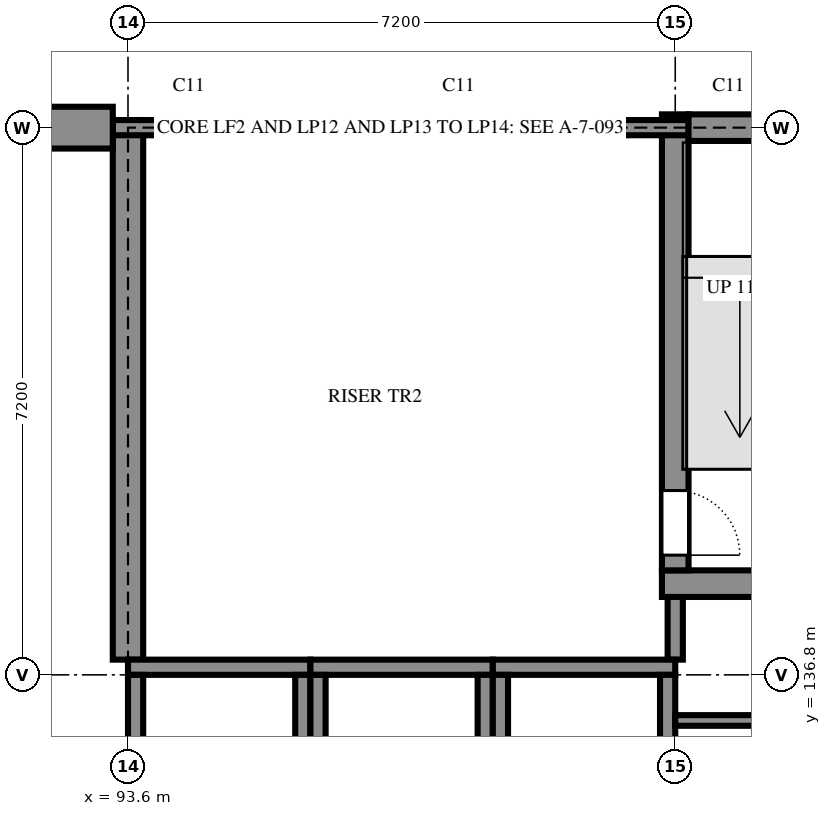
"""IFC4 building model, lengths in metres.
Left out: names, types, materials, properties, quantities, classifications, styles, units other than length and angle.
Written with IfcOpenShell. Run it as: python <this file> out.ifc"""

import sys

from ifc_helpers import new_model, si_unit, direction, frame, frame_2d, origin, origin_2d, place, context, subcontext, project, spatial, rectangle, i_section, extrude, element, fill, save


model = new_model("IFC4")
c1 = context("Model", 3, precision=1e-05, world=origin(), true_north=direction((0.0, 1.0)))
c2 = subcontext(c1, "Body", "Model", "MODEL_VIEW")
j1 = project(units=[si_unit("LENGTHUNIT", "METRE"), si_unit("PLANEANGLEUNIT", "RADIAN")], contexts=[c1])
p1 = place(None, origin())
s1 = spatial("IfcSite", under=j1, at=p1, CompositionType="ELEMENT")
p2 = place(p1, origin())
s2 = spatial("IfcBuilding", under=s1, at=p2, CompositionType="ELEMENT")
p3 = place(p2, frame((0.0, 0.0, 3.6)))
s3 = spatial("IfcBuildingStorey", under=s2, at=p3, CompositionType="ELEMENT", Elevation=3.6)
p4 = place(p3, frame((100.8, 137.0, 0.0), z_axis=(0.0, 0.0, 1.0), x_axis=(0.0, 1.0, 0.0)))
e1 = element("IfcWall", 1, at=p4, inside=s3, PredefinedType="SHEAR", context=c2, shape_type="SweptSolid", body=[
    extrude(rectangle(XDim=1.175, YDim=0.2, at=frame_2d((0.587, 0.0))), origin(), (0.0, 0.0, 1.0), 3.6),
])
p5 = place(p3, frame((100.625, 138.0, 0.0), z_axis=(0.0, 0.0, 1.0), x_axis=(1.0, 0.0, 0.0)))
e2 = element("IfcWall", 2, at=p5, inside=s3, PredefinedType="SHEAR", context=c2, shape_type="SweptSolid", body=[
    extrude(rectangle(XDim=3.75, YDim=0.35, at=frame_2d((1.875, 0.0))), origin(), (0.0, 0.0, 1.0), 3.6),
])
p6 = place(p5, frame((1.375, 0.0, 0.0)))
e3 = element("IfcOpeningElement", 3, at=p6, cuts=e2, PredefinedType="OPENING", context=c2, shape_type="SweptSolid", body=[
    extrude(rectangle(XDim=1.0, YDim=2.1, at=frame_2d((0.5, 1.05))), frame((0.0, 0.185, 0.0), z_axis=(0.0, -1.0, 0.0), x_axis=(1.0, 0.0, 0.0)), (0.0, 0.0, 1.0), 0.37),
])
p7 = place(p3, frame((93.6, 144.1, 0.0), z_axis=(0.0, 0.0, 1.0), x_axis=(0.0, -1.0, 0.0)))
e4 = element("IfcWall", 4, at=p7, inside=s3, PredefinedType="SHEAR", context=c2, shape_type="SweptSolid", body=[
    extrude(rectangle(XDim=7.1, YDim=0.4, at=frame_2d((3.55, 0.0))), origin(), (0.0, 0.0, 1.0), 3.6),
])
p8 = place(p3, frame((100.8, 144.175, 0.0), z_axis=(0.0, 0.0, 1.0), x_axis=(0.0, -1.0, 0.0)))
e5 = element("IfcWall", 5, at=p8, inside=s3, PredefinedType="SHEAR", context=c2, shape_type="SweptSolid", body=[
    extrude(rectangle(XDim=6.0, YDim=0.35, at=frame_2d((3.0, 0.0))), origin(), (0.0, 0.0, 1.0), 3.6),
])
p9 = place(p8, frame((4.95, 0.0, 0.0)))
e6 = element("IfcOpeningElement", 6, at=p9, cuts=e5, PredefinedType="OPENING", context=c2, shape_type="SweptSolid", body=[
    extrude(rectangle(XDim=0.85, YDim=2.1, at=frame_2d((0.425, 1.05))), frame((0.0, 0.185, 0.0), z_axis=(0.0, -1.0, 0.0), x_axis=(1.0, 0.0, 0.0)), (0.0, 0.0, 1.0), 0.37),
])
p10 = place(p3, frame((100.975, 144.0, 0.0), z_axis=(0.0, 0.0, 1.0), x_axis=(-1.0, 0.0, 0.0)))
e7 = element("IfcWall", 7, at=p10, inside=s3, PredefinedType="SHEAR", context=c2, shape_type="SweptSolid", body=[
    extrude(rectangle(XDim=7.575, YDim=0.2, at=frame_2d((3.788, 0.0))), origin(), (0.0, 0.0, 1.0), 3.6),
])
p11 = place(p3, frame((104.2, 144.0, 0.0), z_axis=(0.0, 0.0, 1.0), x_axis=(-1.0, 0.0, 0.0)))
e8 = element("IfcWall", 8, at=p11, inside=s3, PredefinedType="SHEAR", context=c2, shape_type="SweptSolid", body=[
    extrude(rectangle(XDim=3.225, YDim=0.35, at=frame_2d((1.612, 0.0))), origin(), (0.0, 0.0, 1.0), 3.6),
])
p12 = place(p11, frame((1.25, 0.0, 0.6)))
e9 = element("IfcOpeningElement", 9, at=p12, cuts=e8, PredefinedType="OPENING", context=c2, shape_type="SweptSolid", body=[
    extrude(rectangle(XDim=0.9, YDim=2.1, at=frame_2d((0.45, 1.05))), frame((0.0, 0.185, 0.0), z_axis=(0.0, -1.0, 0.0), x_axis=(1.0, 0.0, 0.0)), (0.0, 0.0, 1.0), 0.37),
])
p13 = place(p3, frame((68.35, 144.0, 0.0), z_axis=(0.0, 0.0, 1.0), x_axis=(1.0, 0.0, 0.0)))
e10 = element("IfcWall", 10, at=p13, inside=s3, PredefinedType="SOLIDWALL", context=c2, shape_type="SweptSolid", body=[
    extrude(rectangle(XDim=25.05, YDim=0.55, at=frame_2d((12.525, 0.0))), origin(), (0.0, 0.0, 1.0), 3.6),
])
p14 = place(p3, frame((93.6, 136.9, 0.0), z_axis=(0.0, 0.0, 1.0), x_axis=(1.0, 0.0, 0.0)))
e11 = element("IfcWall", 11, at=p14, inside=s3, PredefinedType="SHEAR", context=c2, shape_type="SweptSolid", body=[
    extrude(rectangle(XDim=2.4, YDim=0.2, at=frame_2d((1.2, 0.0))), origin(), (0.0, 0.0, 1.0), 3.6),
])
for number, where, z_axis, x_axis in (
    (12, (93.7, 134.6, 0.0), (0.0, 0.0, 1.0), (0.0, 1.0, 0.0)),
    (13, (95.9, 134.6, 0.0), (0.0, 0.0, 1.0), (0.0, 1.0, 0.0)),
):
    element("IfcWall", number, at=place(p3, frame(where, z_axis=z_axis, x_axis=x_axis)), inside=s3, PredefinedType="SHEAR", context=c2, shape_type="SweptSolid", body=[
        extrude(rectangle(XDim=2.2, YDim=0.2, at=frame_2d((1.1, 0.0))), origin(), (0.0, 0.0, 1.0), 3.6),
    ])
p15 = place(p3, frame((96.0, 136.9, 0.0), z_axis=(0.0, 0.0, 1.0), x_axis=(1.0, 0.0, 0.0)))
e14 = element("IfcWall", 14, at=p15, inside=s3, PredefinedType="SHEAR", context=c2, shape_type="SweptSolid", body=[
    extrude(rectangle(XDim=2.4, YDim=0.2, at=frame_2d((1.2, 0.0))), origin(), (0.0, 0.0, 1.0), 3.6),
])
for number, where, z_axis, x_axis in (
    (15, (96.1, 134.6, 0.0), (0.0, 0.0, 1.0), (0.0, 1.0, 0.0)),
    (16, (98.3, 134.6, 0.0), (0.0, 0.0, 1.0), (0.0, 1.0, 0.0)),
):
    element("IfcWall", number, at=place(p3, frame(where, z_axis=z_axis, x_axis=x_axis)), inside=s3, PredefinedType="SHEAR", context=c2, shape_type="SweptSolid", body=[
        extrude(rectangle(XDim=2.2, YDim=0.2, at=frame_2d((1.1, 0.0))), origin(), (0.0, 0.0, 1.0), 3.6),
    ])
p16 = place(p3, frame((98.4, 136.9, 0.0), z_axis=(0.0, 0.0, 1.0), x_axis=(1.0, 0.0, 0.0)))
e17 = element("IfcWall", 17, at=p16, inside=s3, PredefinedType="SHEAR", context=c2, shape_type="SweptSolid", body=[
    extrude(rectangle(XDim=2.4, YDim=0.2, at=frame_2d((1.2, 0.0))), origin(), (0.0, 0.0, 1.0), 3.6),
])
for number, where, z_axis, x_axis in (
    (18, (98.5, 134.6, 0.0), (0.0, 0.0, 1.0), (0.0, 1.0, 0.0)),
    (19, (100.7, 134.6, 0.0), (0.0, 0.0, 1.0), (0.0, 1.0, 0.0)),
):
    element("IfcWall", number, at=place(p3, frame(where, z_axis=z_axis, x_axis=x_axis)), inside=s3, PredefinedType="SHEAR", context=c2, shape_type="SweptSolid", body=[
        extrude(rectangle(XDim=2.2, YDim=0.2, at=frame_2d((1.1, 0.0))), origin(), (0.0, 0.0, 1.0), 3.6),
    ])
for number, where, z_axis, x_axis in (
    (20, (94.4, 144.55, 0.0), (0.0, 0.0, 1.0), (1.0, 0.0, 0.0)),
    (21, (97.95, 144.55, 0.0), (0.0, 0.0, 1.0), (1.0, 0.0, 0.0)),
    (22, (101.5, 144.55, 0.0), (0.0, 0.0, 1.0), (1.0, 0.0, 0.0)),
):
    element("IfcColumn", number, at=place(p3, frame(where, z_axis=z_axis, x_axis=x_axis)), inside=s3, PredefinedType="COLUMN", context=c2, shape_type="SweptSolid", body=[
        extrude(i_section(OverallWidth=0.2, OverallDepth=0.2, WebThickness=0.009, FlangeThickness=0.015, FilletRadius=0.018, at=origin_2d()), origin(), (0.0, 0.0, 1.0), 3.6),
    ])
p17 = place(p3, frame((100.8, 136.2, 0.0), z_axis=(0.0, 0.0, 1.0), x_axis=(1.0, 0.0, 0.0)))
e23 = element("IfcWall", 23, at=p17, inside=s3, PredefinedType="PARTITIONING", context=c2, shape_type="SweptSolid", body=[
    extrude(rectangle(XDim=3.3, YDim=0.14, at=frame_2d((1.65, 0.0))), origin(), (0.0, 0.0, 1.0), 3.42),
])
p18 = place(p17, frame((1.2, 0.0, 0.0)))
e24 = element("IfcOpeningElement", 24, at=p18, cuts=e23, PredefinedType="OPENING", context=c2, shape_type="SweptSolid", body=[
    extrude(rectangle(XDim=1.0, YDim=2.1, at=frame_2d((0.5, 1.05))), frame((0.0, 0.08, 0.0), z_axis=(0.0, -1.0, 0.0), x_axis=(1.0, 0.0, 0.0)), (0.0, 0.0, 1.0), 0.16),
])
p19 = place(p9, origin())
e25 = element("IfcDoor", 25, at=p19, inside=s3, OperationType="SINGLE_SWING_LEFT", PredefinedType="DOOR", context=c2, shape_type="SweptSolid", body=[
    extrude(rectangle(XDim=0.85, YDim=2.1, at=frame_2d((0.425, 1.05))), frame((0.0, 0.025, 0.0), z_axis=(0.0, -1.0, 0.0), x_axis=(1.0, 0.0, 0.0)), (0.0, 0.0, 1.0), 0.05),
])
fill(e6, e25)
save(model, sys.argv[1])
